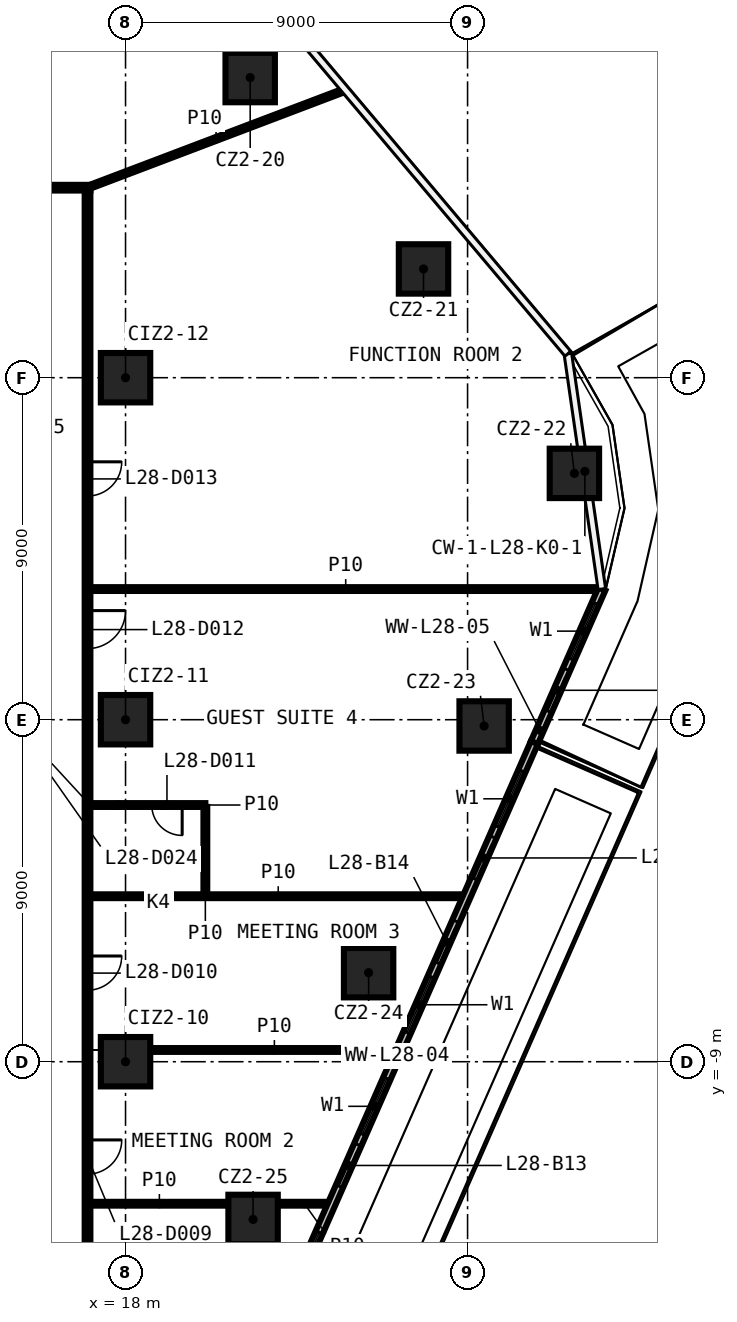
"""IFC4 building model, lengths in metres.
Left out: names, types, materials, properties, quantities, classifications, styles, units other than length and angle.
Written with IfcOpenShell. Run it as: python <this file> out.ifc"""

import sys

from ifc_helpers import new_model, si_unit, direction, frame, frame_2d, origin, origin_2d, place, context, subcontext, project, spatial, rectangle, extrude, element, fill, save


model = new_model("IFC4")
c1 = context("Model", 3, precision=1e-05, world=origin(), true_north=direction((0.0, 1.0)))
c2 = subcontext(c1, "Body", "Model", "MODEL_VIEW")
j1 = project(units=[si_unit("LENGTHUNIT", "METRE"), si_unit("PLANEANGLEUNIT", "RADIAN")], contexts=[c1])
p1 = place(None, origin())
s1 = spatial("IfcSite", under=j1, at=p1, CompositionType="ELEMENT")
p2 = place(p1, origin())
s2 = spatial("IfcBuilding", under=s1, at=p2, CompositionType="ELEMENT")
p3 = place(p2, frame((0.0, 0.0, 128.5)))
s3 = spatial("IfcBuildingStorey", under=s2, at=p3, CompositionType="ELEMENT", Elevation=128.5)
for number, where, z_axis, x_axis in (
    (1, (21.28, 16.898, 0.0), (0.0, 0.0, 1.0), (1.0, 0.0, 0.0)),
    (2, (25.841, 11.862, 0.0), (0.0, 0.0, 1.0), (1.0, 0.0, 0.0)),
    (3, (29.811, 6.482, 0.0), (0.0, 0.0, 1.0), (1.0, 0.0, 0.0)),
    (4, (27.436, -0.165, 0.0), (0.0, 0.0, 1.0), (1.0, 0.0, 0.0)),
    (5, (24.396, -6.657, 0.0), (0.0, 0.0, 1.0), (1.0, 0.0, 0.0)),
    (6, (21.356, -13.15, 0.0), (0.0, 0.0, 1.0), (1.0, 0.0, 0.0)),
    (7, (18.0, -9.0, 0.0), (0.0, 0.0, 1.0), (1.0, 0.0, 0.0)),
    (8, (18.0, 0.0, 0.0), (0.0, 0.0, 1.0), (1.0, 0.0, 0.0)),
    (9, (18.0, 9.0, 0.0), (0.0, 0.0, 1.0), (1.0, 0.0, 0.0)),
):
    element("IfcColumn", number, at=place(p3, frame(where, z_axis=z_axis, x_axis=x_axis)), inside=s3, PredefinedType="COLUMN", context=c2, shape_type="SweptSolid", body=[
        extrude(rectangle(XDim=1.3, YDim=1.3, at=origin_2d()), origin(), (0.0, 0.0, 1.0), 3.3),
    ])
p4 = place(p3, frame((17.075, -12.737, 0.0), z_axis=(0.0, 0.0, 1.0), x_axis=(1.0, 0.0, 0.0)))
e10 = element("IfcWall", 10, at=p4, inside=s3, PredefinedType="PARTITIONING", context=c2, shape_type="SweptSolid", body=[
    extrude(rectangle(XDim=3.631, YDim=0.1, at=frame_2d((1.815, 0.0))), origin(), (0.0, 0.0, 1.0), 3.3),
])
p5 = place(p3, frame((22.006, -12.737, 0.0), z_axis=(0.0, 0.0, 1.0), x_axis=(1.0, 0.0, 0.0)))
e11 = element("IfcWall", 11, at=p5, inside=s3, PredefinedType="PARTITIONING", context=c2, shape_type="SweptSolid", body=[
    extrude(rectangle(XDim=1.4, YDim=0.1, at=frame_2d((0.7, 0.0))), origin(), (0.0, 0.0, 1.0), 3.3),
])
p6 = place(p3, frame((18.65, -8.691, 0.0), z_axis=(0.0, 0.0, 1.0), x_axis=(1.0, 0.0, 0.0)))
e12 = element("IfcWall", 12, at=p6, inside=s3, PredefinedType="PARTITIONING", context=c2, shape_type="SweptSolid", body=[
    extrude(rectangle(XDim=6.533, YDim=0.1, at=frame_2d((3.267, 0.0))), origin(), (0.0, 0.0, 1.0), 3.3),
])
p7 = place(p3, frame((17.075, -4.645, 0.0), z_axis=(0.0, 0.0, 1.0), x_axis=(1.0, 0.0, 0.0)))
e13 = element("IfcWall", 13, at=p7, inside=s3, PredefinedType="PARTITIONING", context=c2, shape_type="SweptSolid", body=[
    extrude(rectangle(XDim=9.885, YDim=0.1, at=frame_2d((4.943, 0.0))), origin(), (0.0, 0.0, 1.0), 3.3),
])
p8 = place(p3, frame((20.1, -2.245, 0.0), z_axis=(0.0, 0.0, 1.0), x_axis=(-1.0, 0.0, 0.0)))
e14 = element("IfcWall", 14, at=p8, inside=s3, PredefinedType="PARTITIONING", context=c2, shape_type="SweptSolid", body=[
    extrude(rectangle(XDim=3.025, YDim=0.1, at=frame_2d((1.513, 0.0))), origin(), (0.0, 0.0, 1.0), 3.3),
])
p9 = place(p8, frame((0.61, 0.0, 0.0)))
e15 = element("IfcOpeningElement", 15, at=p9, cuts=e14, PredefinedType="OPENING", context=c2, shape_type="SweptSolid", body=[
    extrude(rectangle(XDim=0.8, YDim=2.1, at=frame_2d((0.4, 1.05))), frame((0.0, 0.06, 0.0), z_axis=(0.0, -1.0, 0.0), x_axis=(1.0, 0.0, 0.0)), (0.0, 0.0, 1.0), 0.12),
])
p10 = place(p3, frame((17.075, 3.438, 0.0), z_axis=(0.0, 0.0, 1.0), x_axis=(1.0, 0.0, 0.0)))
e16 = element("IfcWall", 16, at=p10, inside=s3, PredefinedType="PARTITIONING", context=c2, shape_type="SweptSolid", body=[
    extrude(rectangle(XDim=13.436, YDim=0.1, at=frame_2d((6.718, 0.0))), origin(), (0.0, 0.0, 1.0), 3.3),
])
p11 = place(p3, frame((-17.075, 14.0, 0.0), z_axis=(0.0, 0.0, 1.0), x_axis=(1.0, 0.0, 0.0)))
e17 = element("IfcWall", 17, at=p11, inside=s3, PredefinedType="PARTITIONING", context=c2, shape_type="SweptSolid", body=[
    extrude(rectangle(XDim=34.15, YDim=0.15, at=frame_2d((17.075, 0.0))), origin(), (0.0, 0.0, 1.0), 3.3),
])
p12 = place(p11, frame((10.954, 0.0, 0.0)))
e18 = element("IfcOpeningElement", 18, at=p12, cuts=e17, PredefinedType="OPENING", context=c2, shape_type="SweptSolid", body=[
    extrude(rectangle(XDim=0.9, YDim=2.1, at=frame_2d((0.45, 1.05))), frame((0.0, 0.085, 0.0), z_axis=(0.0, -1.0, 0.0), x_axis=(1.0, 0.0, 0.0)), (0.0, 0.0, 1.0), 0.17),
])
p13 = place(p11, frame((7.617, 0.0, 0.0)))
e19 = element("IfcOpeningElement", 19, at=p13, cuts=e17, PredefinedType="OPENING", context=c2, shape_type="SweptSolid", body=[
    extrude(rectangle(XDim=1.0, YDim=2.1, at=frame_2d((0.5, 1.05))), frame((0.0, 0.085, 0.0), z_axis=(0.0, -1.0, 0.0), x_axis=(1.0, 0.0, 0.0)), (0.0, 0.0, 1.0), 0.17),
])
p14 = place(p11, frame((2.425, 0.0, 0.0)))
e20 = element("IfcOpeningElement", 20, at=p14, cuts=e17, PredefinedType="OPENING", context=c2, shape_type="SweptSolid", body=[
    extrude(rectangle(XDim=0.9, YDim=2.1, at=frame_2d((0.45, 1.05))), frame((0.0, 0.085, 0.0), z_axis=(0.0, -1.0, 0.0), x_axis=(1.0, 0.0, 0.0)), (0.0, 0.0, 1.0), 0.17),
])
p15 = place(p3, frame((17.0, 14.0, 0.0), z_axis=(0.0, 0.0, 1.0), x_axis=(0.934953139897, 0.354771230791, 0.0)))
e21 = element("IfcWall", 21, at=p15, inside=s3, PredefinedType="PARTITIONING", context=c2, shape_type="SweptSolid", body=[
    extrude(rectangle(XDim=7.234, YDim=0.1, at=frame_2d((3.617, 0.0))), origin(), (0.0, 0.0, 1.0), 3.3),
])
p16 = place(p3, frame((20.1, -4.595, 0.0), z_axis=(0.0, 0.0, 1.0), x_axis=(0.0, 1.0, 0.0)))
e22 = element("IfcWall", 22, at=p16, inside=s3, PredefinedType="PARTITIONING", context=c2, shape_type="SweptSolid", body=[
    extrude(rectangle(XDim=2.3, YDim=0.1, at=frame_2d((1.15, 0.0))), origin(), (0.0, 0.0, 1.0), 3.3),
])
p17 = place(p3, frame((17.0, 13.925, 0.0), z_axis=(0.0, 0.0, 1.0), x_axis=(0.0, -1.0, 0.0)))
e23 = element("IfcWall", 23, at=p17, inside=s3, PredefinedType="PARTITIONING", context=c2, shape_type="SweptSolid", body=[
    extrude(rectangle(XDim=27.85, YDim=0.15, at=frame_2d((13.925, 0.0))), origin(), (0.0, 0.0, 1.0), 3.3),
])
p18 = place(p17, frame((24.983, 0.0, 0.0)))
e24 = element("IfcOpeningElement", 24, at=p18, cuts=e23, PredefinedType="OPENING", context=c2, shape_type="SweptSolid", body=[
    extrude(rectangle(XDim=0.9, YDim=2.1, at=frame_2d((0.45, 1.05))), frame((0.0, 0.085, 0.0), z_axis=(0.0, -1.0, 0.0), x_axis=(1.0, 0.0, 0.0)), (0.0, 0.0, 1.0), 0.17),
])
p19 = place(p17, frame((20.143, 0.0, 0.0)))
e25 = element("IfcOpeningElement", 25, at=p19, cuts=e23, PredefinedType="OPENING", context=c2, shape_type="SweptSolid", body=[
    extrude(rectangle(XDim=0.9, YDim=2.1, at=frame_2d((0.45, 1.05))), frame((0.0, 0.085, 0.0), z_axis=(0.0, -1.0, 0.0), x_axis=(1.0, 0.0, 0.0)), (0.0, 0.0, 1.0), 0.17),
])
p20 = place(p17, frame((11.054, 0.0, 0.0)))
e26 = element("IfcOpeningElement", 26, at=p20, cuts=e23, PredefinedType="OPENING", context=c2, shape_type="SweptSolid", body=[
    extrude(rectangle(XDim=1.0, YDim=2.1, at=frame_2d((0.5, 1.05))), frame((0.0, 0.085, 0.0), z_axis=(0.0, -1.0, 0.0), x_axis=(1.0, 0.0, 0.0)), (0.0, 0.0, 1.0), 0.17),
])
p21 = place(p17, frame((7.139, 0.0, 0.0)))
e27 = element("IfcOpeningElement", 27, at=p21, cuts=e23, PredefinedType="OPENING", context=c2, shape_type="SweptSolid", body=[
    extrude(rectangle(XDim=0.9, YDim=2.1, at=frame_2d((0.45, 1.05))), frame((0.0, 0.085, 0.0), z_axis=(0.0, -1.0, 0.0), x_axis=(1.0, 0.0, 0.0)), (0.0, 0.0, 1.0), 0.17),
])
p22 = place(p3, frame((21.65, -16.783, 0.0), z_axis=(0.0, 0.0, 1.0), x_axis=(0.402171088909, 0.915564533633, 0.0)))
e28 = element("IfcWall", 28, at=p22, inside=s3, PredefinedType="SOLIDWALL", context=c2, shape_type="SweptSolid", body=[
    extrude(rectangle(XDim=17.677, YDim=0.2, at=frame_2d((8.838, 0.0))), origin(), (0.0, 0.0, 1.0), 3.3),
])
p23 = place(p22, frame((2.0, 0.0, 0.6)))
e29 = element("IfcOpeningElement", 29, at=p23, cuts=e28, PredefinedType="OPENING", context=c2, shape_type="SweptSolid", body=[
    extrude(rectangle(XDim=1.6, YDim=2.4, at=frame_2d((0.8, 1.2))), frame((0.0, 0.11, 0.0), z_axis=(0.0, -1.0, 0.0), x_axis=(1.0, 0.0, 0.0)), (0.0, 0.0, 1.0), 0.22),
])
p24 = place(p22, frame((0.5, 0.0, 0.0)))
e30 = element("IfcOpeningElement", 30, at=p24, cuts=e28, PredefinedType="OPENING", context=c2, shape_type="SweptSolid", body=[
    extrude(rectangle(XDim=1.2, YDim=2.4, at=frame_2d((0.6, 1.2))), frame((0.0, 0.11, 0.0), z_axis=(0.0, -1.0, 0.0), x_axis=(1.0, 0.0, 0.0)), (0.0, 0.0, 1.0), 0.22),
])
p25 = place(p22, frame((6.419, 0.0, 0.6)))
e31 = element("IfcOpeningElement", 31, at=p25, cuts=e28, PredefinedType="OPENING", context=c2, shape_type="SweptSolid", body=[
    extrude(rectangle(XDim=1.6, YDim=2.4, at=frame_2d((0.8, 1.2))), frame((0.0, 0.11, 0.0), z_axis=(0.0, -1.0, 0.0), x_axis=(1.0, 0.0, 0.0)), (0.0, 0.0, 1.0), 0.22),
])
p26 = place(p22, frame((4.919, 0.0, 0.0)))
e32 = element("IfcOpeningElement", 32, at=p26, cuts=e28, PredefinedType="OPENING", context=c2, shape_type="SweptSolid", body=[
    extrude(rectangle(XDim=1.2, YDim=2.4, at=frame_2d((0.6, 1.2))), frame((0.0, 0.11, 0.0), z_axis=(0.0, -1.0, 0.0), x_axis=(1.0, 0.0, 0.0)), (0.0, 0.0, 1.0), 0.22),
])
p27 = place(p22, frame((9.338, 0.0, 0.6)))
e33 = element("IfcOpeningElement", 33, at=p27, cuts=e28, PredefinedType="OPENING", context=c2, shape_type="SweptSolid", body=[
    extrude(rectangle(XDim=1.6, YDim=2.4, at=frame_2d((0.8, 1.2))), frame((0.0, 0.11, 0.0), z_axis=(0.0, -1.0, 0.0), x_axis=(1.0, 0.0, 0.0)), (0.0, 0.0, 1.0), 0.22),
])
p28 = place(p22, frame((11.338, 0.0, 0.0)))
e34 = element("IfcOpeningElement", 34, at=p28, cuts=e28, PredefinedType="OPENING", context=c2, shape_type="SweptSolid", body=[
    extrude(rectangle(XDim=1.2, YDim=2.4, at=frame_2d((0.6, 1.2))), frame((0.0, 0.11, 0.0), z_axis=(0.0, -1.0, 0.0), x_axis=(1.0, 0.0, 0.0)), (0.0, 0.0, 1.0), 0.22),
])
p29 = place(p22, frame((15.258, 0.0, 0.6)))
e35 = element("IfcOpeningElement", 35, at=p29, cuts=e28, PredefinedType="OPENING", context=c2, shape_type="SweptSolid", body=[
    extrude(rectangle(XDim=1.6, YDim=2.4, at=frame_2d((0.8, 1.2))), frame((0.0, 0.11, 0.0), z_axis=(0.0, -1.0, 0.0), x_axis=(1.0, 0.0, 0.0)), (0.0, 0.0, 1.0), 0.22),
])
p30 = place(p22, frame((13.758, 0.0, 0.0)))
e36 = element("IfcOpeningElement", 36, at=p30, cuts=e28, PredefinedType="OPENING", context=c2, shape_type="SweptSolid", body=[
    extrude(rectangle(XDim=1.2, YDim=2.4, at=frame_2d((0.6, 1.2))), frame((0.0, 0.11, 0.0), z_axis=(0.0, -1.0, 0.0), x_axis=(1.0, 0.0, 0.0)), (0.0, 0.0, 1.0), 0.22),
])
p31 = place(p3, frame((28.76, -0.599, 0.0), z_axis=(0.0, 0.0, 1.0), x_axis=(0.402194955318, 0.915554049697, 0.0)))
e37 = element("IfcWall", 37, at=p31, inside=s3, PredefinedType="SOLIDWALL", context=c2, shape_type="SweptSolid", body=[
    extrude(rectangle(XDim=4.41, YDim=0.2, at=frame_2d((2.205, 0.0))), origin(), (0.0, 0.0, 1.0), 3.3),
])
p32 = place(p31, frame((2.4, 0.0, 0.6)))
e38 = element("IfcOpeningElement", 38, at=p32, cuts=e37, PredefinedType="OPENING", context=c2, shape_type="SweptSolid", body=[
    extrude(rectangle(XDim=1.6, YDim=2.4, at=frame_2d((0.8, 1.2))), frame((0.0, 0.11, 0.0), z_axis=(0.0, -1.0, 0.0), x_axis=(1.0, 0.0, 0.0)), (0.0, 0.0, 1.0), 0.22),
])
p33 = place(p31, frame((0.9, 0.0, 0.0)))
e39 = element("IfcOpeningElement", 39, at=p33, cuts=e37, PredefinedType="OPENING", context=c2, shape_type="SweptSolid", body=[
    extrude(rectangle(XDim=1.2, YDim=2.4, at=frame_2d((0.6, 1.2))), frame((0.0, 0.11, 0.0), z_axis=(0.0, -1.0, 0.0), x_axis=(1.0, 0.0, 0.0)), (0.0, 0.0, 1.0), 0.22),
])
p34 = place(p18, origin())
e40 = element("IfcDoor", 40, at=p34, inside=s3, OperationType="SINGLE_SWING_RIGHT", PredefinedType="DOOR", context=c2, shape_type="SweptSolid", body=[
    extrude(rectangle(XDim=0.9, YDim=2.1, at=frame_2d((0.45, 1.05))), frame((0.0, 0.025, 0.0), z_axis=(0.0, -1.0, 0.0), x_axis=(1.0, 0.0, 0.0)), (0.0, 0.0, 1.0), 0.05),
])
fill(e24, e40)
p35 = place(p19, origin())
e41 = element("IfcDoor", 41, at=p35, inside=s3, OperationType="SINGLE_SWING_LEFT", PredefinedType="DOOR", context=c2, shape_type="SweptSolid", body=[
    extrude(rectangle(XDim=0.9, YDim=2.1, at=frame_2d((0.45, 1.05))), frame((0.0, 0.025, 0.0), z_axis=(0.0, -1.0, 0.0), x_axis=(1.0, 0.0, 0.0)), (0.0, 0.0, 1.0), 0.05),
])
fill(e25, e41)
p36 = place(p9, origin())
e42 = element("IfcDoor", 42, at=p36, inside=s3, OperationType="SINGLE_SWING_LEFT", PredefinedType="DOOR", context=c2, shape_type="SweptSolid", body=[
    extrude(rectangle(XDim=0.8, YDim=2.1, at=frame_2d((0.4, 1.05))), frame((0.0, 0.025, 0.0), z_axis=(0.0, -1.0, 0.0), x_axis=(1.0, 0.0, 0.0)), (0.0, 0.0, 1.0), 0.05),
])
fill(e15, e42)
p37 = place(p20, origin())
e43 = element("IfcDoor", 43, at=p37, inside=s3, OperationType="SINGLE_SWING_RIGHT", PredefinedType="DOOR", context=c2, shape_type="SweptSolid", body=[
    extrude(rectangle(XDim=1.0, YDim=2.1, at=frame_2d((0.5, 1.05))), frame((0.0, 0.025, 0.0), z_axis=(0.0, -1.0, 0.0), x_axis=(1.0, 0.0, 0.0)), (0.0, 0.0, 1.0), 0.05),
])
fill(e26, e43)
p38 = place(p21, origin())
e44 = element("IfcDoor", 44, at=p38, inside=s3, OperationType="SINGLE_SWING_LEFT", PredefinedType="DOOR", context=c2, shape_type="SweptSolid", body=[
    extrude(rectangle(XDim=0.9, YDim=2.1, at=frame_2d((0.45, 1.05))), frame((0.0, 0.025, 0.0), z_axis=(0.0, -1.0, 0.0), x_axis=(1.0, 0.0, 0.0)), (0.0, 0.0, 1.0), 0.05),
])
fill(e27, e44)
p39 = place(p23, origin())
e45 = element("IfcWindow", 45, at=p39, inside=s3, PartitioningType="SINGLE_PANEL", PredefinedType="WINDOW", context=c2, shape_type="SweptSolid", body=[
    extrude(rectangle(XDim=1.6, YDim=2.4, at=frame_2d((0.8, 1.2))), frame((0.0, 0.03, 0.0), z_axis=(0.0, -1.0, 0.0), x_axis=(1.0, 0.0, 0.0)), (0.0, 0.0, 1.0), 0.06),
])
fill(e29, e45)
p40 = place(p25, origin())
e46 = element("IfcWindow", 46, at=p40, inside=s3, PartitioningType="SINGLE_PANEL", PredefinedType="WINDOW", context=c2, shape_type="SweptSolid", body=[
    extrude(rectangle(XDim=1.6, YDim=2.4, at=frame_2d((0.8, 1.2))), frame((0.0, 0.03, 0.0), z_axis=(0.0, -1.0, 0.0), x_axis=(1.0, 0.0, 0.0)), (0.0, 0.0, 1.0), 0.06),
])
fill(e31, e46)
p41 = place(p26, origin())
e47 = element("IfcDoor", 47, at=p41, inside=s3, OperationType="SLIDING_TO_LEFT", PredefinedType="DOOR", context=c2, shape_type="SweptSolid", body=[
    extrude(rectangle(XDim=1.2, YDim=2.4, at=frame_2d((0.6, 1.2))), frame((0.0, 0.025, 0.0), z_axis=(0.0, -1.0, 0.0), x_axis=(1.0, 0.0, 0.0)), (0.0, 0.0, 1.0), 0.05),
])
fill(e32, e47)
p42 = place(p27, origin())
e48 = element("IfcWindow", 48, at=p42, inside=s3, PartitioningType="SINGLE_PANEL", PredefinedType="WINDOW", context=c2, shape_type="SweptSolid", body=[
    extrude(rectangle(XDim=1.6, YDim=2.4, at=frame_2d((0.8, 1.2))), frame((0.0, 0.03, 0.0), z_axis=(0.0, -1.0, 0.0), x_axis=(1.0, 0.0, 0.0)), (0.0, 0.0, 1.0), 0.06),
])
fill(e33, e48)
p43 = place(p28, origin())
e49 = element("IfcDoor", 49, at=p43, inside=s3, OperationType="SLIDING_TO_LEFT", PredefinedType="DOOR", context=c2, shape_type="SweptSolid", body=[
    extrude(rectangle(XDim=1.2, YDim=2.4, at=frame_2d((0.6, 1.2))), frame((0.0, 0.025, 0.0), z_axis=(0.0, -1.0, 0.0), x_axis=(1.0, 0.0, 0.0)), (0.0, 0.0, 1.0), 0.05),
])
fill(e34, e49)
p44 = place(p29, origin())
e50 = element("IfcWindow", 50, at=p44, inside=s3, PartitioningType="SINGLE_PANEL", PredefinedType="WINDOW", context=c2, shape_type="SweptSolid", body=[
    extrude(rectangle(XDim=1.6, YDim=2.4, at=frame_2d((0.8, 1.2))), frame((0.0, 0.03, 0.0), z_axis=(0.0, -1.0, 0.0), x_axis=(1.0, 0.0, 0.0)), (0.0, 0.0, 1.0), 0.06),
])
fill(e35, e50)
p45 = place(p30, origin())
e51 = element("IfcDoor", 51, at=p45, inside=s3, OperationType="SLIDING_TO_LEFT", PredefinedType="DOOR", context=c2, shape_type="SweptSolid", body=[
    extrude(rectangle(XDim=1.2, YDim=2.4, at=frame_2d((0.6, 1.2))), frame((0.0, 0.025, 0.0), z_axis=(0.0, -1.0, 0.0), x_axis=(1.0, 0.0, 0.0)), (0.0, 0.0, 1.0), 0.05),
])
fill(e36, e51)
p46 = place(p32, origin())
e52 = element("IfcWindow", 52, at=p46, inside=s3, PartitioningType="SINGLE_PANEL", PredefinedType="WINDOW", context=c2, shape_type="SweptSolid", body=[
    extrude(rectangle(XDim=1.6, YDim=2.4, at=frame_2d((0.8, 1.2))), frame((0.0, 0.03, 0.0), z_axis=(0.0, -1.0, 0.0), x_axis=(1.0, 0.0, 0.0)), (0.0, 0.0, 1.0), 0.06),
])
fill(e38, e52)
p47 = place(p33, origin())
e53 = element("IfcDoor", 53, at=p47, inside=s3, OperationType="SLIDING_TO_LEFT", PredefinedType="DOOR", context=c2, shape_type="SweptSolid", body=[
    extrude(rectangle(XDim=1.2, YDim=2.4, at=frame_2d((0.6, 1.2))), frame((0.0, 0.025, 0.0), z_axis=(0.0, -1.0, 0.0), x_axis=(1.0, 0.0, 0.0)), (0.0, 0.0, 1.0), 0.05),
])
fill(e39, e53)
save(model, sys.argv[1])
